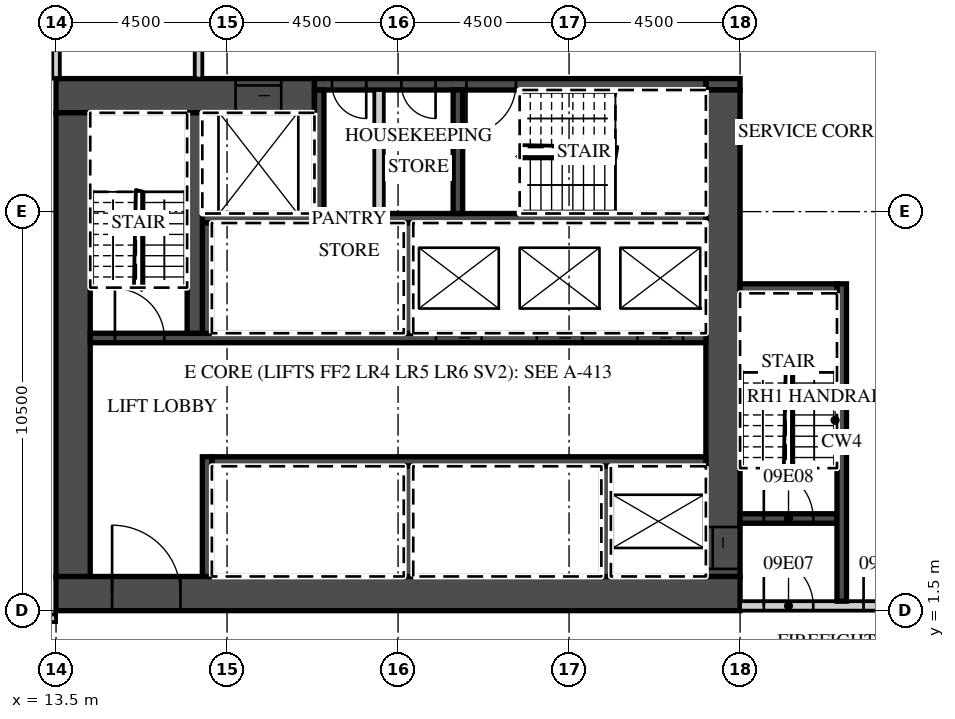
"""IFC4 building model, lengths in metres.
Left out: names, types, materials, properties, quantities, classifications, styles, units other than length and angle.
Written with IfcOpenShell. Run it as: python <this file> out.ifc"""

import sys

from ifc_helpers import new_model, si_unit, direction, frame, frame_2d, origin, place, context, subcontext, project, spatial, rectangle, extrude, element, fill, save


model = new_model("IFC4")
c1 = context("Model", 3, precision=1e-05, world=origin(), true_north=direction((0.0, 1.0)))
c2 = subcontext(c1, "Body", "Model", "MODEL_VIEW")
j1 = project(units=[si_unit("LENGTHUNIT", "METRE"), si_unit("PLANEANGLEUNIT", "RADIAN")], contexts=[c1])
p1 = place(None, origin())
s1 = spatial("IfcSite", under=j1, at=p1, CompositionType="ELEMENT")
p2 = place(p1, origin())
s2 = spatial("IfcBuilding", under=s1, at=p2, CompositionType="ELEMENT")
p3 = place(p2, frame((0.0, 0.0, 60.0)))
s3 = spatial("IfcBuildingStorey", under=s2, at=p3, CompositionType="ELEMENT", Elevation=60.0)
p4 = place(p3, frame((13.5, 15.5, 0.0), z_axis=(0.0, 0.0, 1.0), x_axis=(0.0, 1.0, 0.0)))
e1 = element("IfcWall", 1, at=p4, inside=s3, PredefinedType="PARTITIONING", context=c2, shape_type="SweptSolid", body=[
    extrude(rectangle(XDim=6.05, YDim=0.2, at=frame_2d((3.025, 0.0))), origin(), (0.0, 0.0, 1.0), 3.02),
])
p5 = place(p3, frame((-44.55, 1.3, 0.0), z_axis=(0.0, 0.0, 1.0), x_axis=(1.0, 0.0, 0.0)))
e2 = element("IfcWall", 2, at=p5, inside=s3, PredefinedType="PARTITIONING", context=c2, shape_type="SweptSolid", body=[
    extrude(rectangle(XDim=58.05, YDim=0.2, at=frame_2d((29.025, 0.0))), origin(), (0.0, 0.0, 1.0), 3.02),
])
p6 = place(p5, frame((0.525, 0.0, 0.0)))
e3 = element("IfcOpeningElement", 3, at=p6, cuts=e2, PredefinedType="OPENING", context=c2, shape_type="SweptSolid", body=[
    extrude(rectangle(XDim=1.0, YDim=2.1, at=frame_2d((0.5, 1.05))), frame((0.0, 0.11, 0.0), z_axis=(0.0, -1.0, 0.0), x_axis=(1.0, 0.0, 0.0)), (0.0, 0.0, 1.0), 0.22),
])
p7 = place(p5, frame((6.975, 0.0, 0.0)))
e4 = element("IfcOpeningElement", 4, at=p7, cuts=e2, PredefinedType="OPENING", context=c2, shape_type="SweptSolid", body=[
    extrude(rectangle(XDim=1.0, YDim=2.1, at=frame_2d((0.5, 1.05))), frame((0.0, 0.11, 0.0), z_axis=(0.0, -1.0, 0.0), x_axis=(1.0, 0.0, 0.0)), (0.0, 0.0, 1.0), 0.22),
])
p8 = place(p5, frame((10.987, 0.0, 0.0)))
e5 = element("IfcOpeningElement", 5, at=p8, cuts=e2, PredefinedType="OPENING", context=c2, shape_type="SweptSolid", body=[
    extrude(rectangle(XDim=1.2, YDim=2.1, at=frame_2d((0.6, 1.05))), frame((0.0, 0.11, 0.0), z_axis=(0.0, -1.0, 0.0), x_axis=(1.0, 0.0, 0.0)), (0.0, 0.0, 1.0), 0.22),
])
p9 = place(p5, frame((19.987, 0.0, 0.0)))
e6 = element("IfcOpeningElement", 6, at=p9, cuts=e2, PredefinedType="OPENING", context=c2, shape_type="SweptSolid", body=[
    extrude(rectangle(XDim=1.2, YDim=2.1, at=frame_2d((0.6, 1.05))), frame((0.0, 0.11, 0.0), z_axis=(0.0, -1.0, 0.0), x_axis=(1.0, 0.0, 0.0)), (0.0, 0.0, 1.0), 0.22),
])
p10 = place(p5, frame((29.5, 0.0, 0.0)))
e7 = element("IfcOpeningElement", 7, at=p10, cuts=e2, PredefinedType="OPENING", context=c2, shape_type="SweptSolid", body=[
    extrude(rectangle(XDim=1.0, YDim=2.1, at=frame_2d((0.5, 1.05))), frame((0.0, 0.11, 0.0), z_axis=(0.0, -1.0, 0.0), x_axis=(1.0, 0.0, 0.0)), (0.0, 0.0, 1.0), 0.22),
])
p11 = place(p5, frame((33.975, 0.0, 0.0)))
e8 = element("IfcOpeningElement", 8, at=p11, cuts=e2, PredefinedType="OPENING", context=c2, shape_type="SweptSolid", body=[
    extrude(rectangle(XDim=1.0, YDim=2.1, at=frame_2d((0.5, 1.05))), frame((0.0, 0.11, 0.0), z_axis=(0.0, -1.0, 0.0), x_axis=(1.0, 0.0, 0.0)), (0.0, 0.0, 1.0), 0.22),
])
p12 = place(p5, frame((40.912, 0.0, 0.0)))
e9 = element("IfcOpeningElement", 9, at=p12, cuts=e2, PredefinedType="OPENING", context=c2, shape_type="SweptSolid", body=[
    extrude(rectangle(XDim=1.2, YDim=2.1, at=frame_2d((0.6, 1.05))), frame((0.0, 0.11, 0.0), z_axis=(0.0, -1.0, 0.0), x_axis=(1.0, 0.0, 0.0)), (0.0, 0.0, 1.0), 0.22),
])
p13 = place(p5, frame((47.5, 0.0, 0.0)))
e10 = element("IfcOpeningElement", 10, at=p13, cuts=e2, PredefinedType="OPENING", context=c2, shape_type="SweptSolid", body=[
    extrude(rectangle(XDim=1.0, YDim=2.1, at=frame_2d((0.5, 1.05))), frame((0.0, 0.11, 0.0), z_axis=(0.0, -1.0, 0.0), x_axis=(1.0, 0.0, 0.0)), (0.0, 0.0, 1.0), 0.22),
])
p14 = place(p5, frame((51.975, 0.0, 0.0)))
e11 = element("IfcOpeningElement", 11, at=p14, cuts=e2, PredefinedType="OPENING", context=c2, shape_type="SweptSolid", body=[
    extrude(rectangle(XDim=1.0, YDim=2.1, at=frame_2d((0.5, 1.05))), frame((0.0, 0.11, 0.0), z_axis=(0.0, -1.0, 0.0), x_axis=(1.0, 0.0, 0.0)), (0.0, 0.0, 1.0), 0.22),
])
p15 = place(p5, frame((56.475, 0.0, 0.0)))
e12 = element("IfcOpeningElement", 12, at=p15, cuts=e2, PredefinedType="OPENING", context=c2, shape_type="SweptSolid", body=[
    extrude(rectangle(XDim=1.0, YDim=2.1, at=frame_2d((0.5, 1.05))), frame((0.0, 0.11, 0.0), z_axis=(0.0, -1.0, 0.0), x_axis=(1.0, 0.0, 0.0)), (0.0, 0.0, 1.0), 0.22),
])
p16 = place(p3, frame((13.5, 1.95, 0.0), z_axis=(0.0, 0.0, 1.0), x_axis=(1.0, 0.0, 0.0)))
e13 = element("IfcWall", 13, at=p16, inside=s3, PredefinedType="SHEAR", context=c2, shape_type="SweptSolid", body=[
    extrude(rectangle(XDim=18.0, YDim=0.9, at=frame_2d((9.0, 0.0))), origin(), (0.0, 0.0, 1.0), 3.02),
])
p17 = place(p16, frame((1.475, 0.0, 0.0)))
e14 = element("IfcOpeningElement", 14, at=p17, cuts=e13, PredefinedType="OPENING", context=c2, shape_type="SweptSolid", body=[
    extrude(rectangle(XDim=1.8, YDim=2.1, at=frame_2d((0.9, 1.05))), frame((0.0, 0.46, 0.0), z_axis=(0.0, -1.0, 0.0), x_axis=(1.0, 0.0, 0.0)), (0.0, 0.0, 1.0), 0.92),
])
p18 = place(p3, frame((13.5, 15.05, 0.0), z_axis=(0.0, 0.0, 1.0), x_axis=(1.0, 0.0, 0.0)))
e15 = element("IfcWall", 15, at=p18, inside=s3, PredefinedType="SHEAR", context=c2, shape_type="SweptSolid", body=[
    extrude(rectangle(XDim=6.8, YDim=0.9, at=frame_2d((3.4, 0.0))), origin(), (0.0, 0.0, 1.0), 3.02),
])
p19 = place(p18, frame((4.725, 0.0, 0.0)))
e16 = element("IfcOpeningElement", 16, at=p19, cuts=e15, PredefinedType="OPENING", context=c2, shape_type="SweptSolid", body=[
    extrude(rectangle(XDim=1.2, YDim=2.1, at=frame_2d((0.6, 1.05))), frame((0.0, 0.46, 0.0), z_axis=(0.0, -1.0, 0.0), x_axis=(1.0, 0.0, 0.0)), (0.0, 0.0, 1.0), 0.92),
])
p20 = place(p3, frame((30.6, 15.35, 0.0), z_axis=(0.0, 0.0, 1.0), x_axis=(1.0, 0.0, 0.0)))
e17 = element("IfcWall", 17, at=p20, inside=s3, PredefinedType="SHEAR", context=c2, shape_type="SweptSolid", body=[
    extrude(rectangle(XDim=0.9, YDim=0.3, at=frame_2d((0.45, 0.0))), origin(), (0.0, 0.0, 1.0), 3.02),
])
p21 = place(p3, frame((20.3, 15.35, 0.0), z_axis=(0.0, 0.0, 1.0), x_axis=(1.0, 0.0, 0.0)))
e18 = element("IfcWall", 18, at=p21, inside=s3, PredefinedType="SHEAR", context=c2, shape_type="SweptSolid", body=[
    extrude(rectangle(XDim=10.3, YDim=0.3, at=frame_2d((5.15, 0.0))), origin(), (0.0, 0.0, 1.0), 3.02),
])
p22 = place(p21, frame((4.0, 0.0, 0.0)))
e19 = element("IfcOpeningElement", 19, at=p22, cuts=e18, PredefinedType="OPENING", context=c2, shape_type="SweptSolid", body=[
    extrude(rectangle(XDim=1.3, YDim=2.1, at=frame_2d((0.65, 1.05))), frame((0.0, 0.16, 0.0), z_axis=(0.0, -1.0, 0.0), x_axis=(1.0, 0.0, 0.0)), (0.0, 0.0, 1.0), 0.32),
])
p23 = place(p21, frame((2.288, 0.0, 0.0)))
e20 = element("IfcOpeningElement", 20, at=p23, cuts=e18, PredefinedType="OPENING", context=c2, shape_type="SweptSolid", body=[
    extrude(rectangle(XDim=0.9, YDim=2.1, at=frame_2d((0.45, 1.05))), frame((0.0, 0.16, 0.0), z_axis=(0.0, -1.0, 0.0), x_axis=(1.0, 0.0, 0.0)), (0.0, 0.0, 1.0), 0.32),
])
p24 = place(p21, frame((0.462, 0.0, 0.0)))
e21 = element("IfcOpeningElement", 21, at=p24, cuts=e18, PredefinedType="OPENING", context=c2, shape_type="SweptSolid", body=[
    extrude(rectangle(XDim=0.9, YDim=2.1, at=frame_2d((0.45, 1.05))), frame((0.0, 0.16, 0.0), z_axis=(0.0, -1.0, 0.0), x_axis=(1.0, 0.0, 0.0)), (0.0, 0.0, 1.0), 0.32),
])
p25 = place(p3, frame((31.05, 2.4, 0.0), z_axis=(0.0, 0.0, 1.0), x_axis=(0.0, 1.0, 0.0)))
e22 = element("IfcWall", 22, at=p25, inside=s3, PredefinedType="SHEAR", context=c2, shape_type="SweptSolid", body=[
    extrude(rectangle(XDim=12.8, YDim=0.9, at=frame_2d((6.4, 0.0))), origin(), (0.0, 0.0, 1.0), 3.02),
])
p26 = place(p25, frame((0.2, 0.0, 0.0)))
e23 = element("IfcOpeningElement", 23, at=p26, cuts=e22, PredefinedType="OPENING", context=c2, shape_type="SweptSolid", body=[
    extrude(rectangle(XDim=1.1, YDim=2.1, at=frame_2d((0.55, 1.05))), frame((0.0, 0.46, 0.0), z_axis=(0.0, -1.0, 0.0), x_axis=(1.0, 0.0, 0.0)), (0.0, 0.0, 1.0), 0.92),
])
p27 = place(p3, frame((13.95, 2.4, 0.0), z_axis=(0.0, 0.0, 1.0), x_axis=(0.0, 1.0, 0.0)))
e24 = element("IfcWall", 24, at=p27, inside=s3, PredefinedType="SHEAR", context=c2, shape_type="SweptSolid", body=[
    extrude(rectangle(XDim=12.2, YDim=0.9, at=frame_2d((6.1, 0.0))), origin(), (0.0, 0.0, 1.0), 3.02),
])
p28 = place(p3, frame((17.6, 5.425, 0.0), z_axis=(0.0, 0.0, 1.0), x_axis=(1.0, 0.0, 0.0)))
e25 = element("IfcWall", 25, at=p28, inside=s3, PredefinedType="SHEAR", context=c2, shape_type="SweptSolid", body=[
    extrude(rectangle(XDim=13.0, YDim=0.25, at=frame_2d((6.5, 0.0))), origin(), (0.0, 0.0, 1.0), 3.02),
])
p29 = place(p3, frame((17.475, 2.4, 0.0), z_axis=(0.0, 0.0, 1.0), x_axis=(0.0, 1.0, 0.0)))
e26 = element("IfcWall", 26, at=p29, inside=s3, PredefinedType="SHEAR", context=c2, shape_type="SweptSolid", body=[
    extrude(rectangle(XDim=3.15, YDim=0.25, at=frame_2d((1.575, 0.0))), origin(), (0.0, 0.0, 1.0), 3.02),
])
for number, where, z_axis, x_axis in (
    (27, (27.975, 2.4, 0.0), (0.0, 0.0, 1.0), (0.0, 1.0, 0.0)),
    (28, (22.775, 2.4, 0.0), (0.0, 0.0, 1.0), (0.0, 1.0, 0.0)),
):
    element("IfcWall", number, at=place(p3, frame(where, z_axis=z_axis, x_axis=x_axis)), inside=s3, PredefinedType="SHEAR", context=c2, shape_type="SweptSolid", body=[
        extrude(rectangle(XDim=2.9, YDim=0.25, at=frame_2d((1.45, 0.0))), origin(), (0.0, 0.0, 1.0), 3.02),
    ])
p30 = place(p3, frame((14.4, 8.675, 0.0), z_axis=(0.0, 0.0, 1.0), x_axis=(1.0, 0.0, 0.0)))
e29 = element("IfcWall", 29, at=p30, inside=s3, PredefinedType="SHEAR", context=c2, shape_type="SweptSolid", body=[
    extrude(rectangle(XDim=16.2, YDim=0.25, at=frame_2d((8.1, 0.0))), origin(), (0.0, 0.0, 1.0), 3.02),
])
p31 = place(p30, frame((14.4, 0.0, 0.0)))
e30 = element("IfcOpeningElement", 30, at=p31, cuts=e29, PredefinedType="OPENING", context=c2, shape_type="SweptSolid", body=[
    extrude(rectangle(XDim=1.2, YDim=2.1, at=frame_2d((0.6, 1.05))), frame((0.0, 0.135, 0.0), z_axis=(0.0, -1.0, 0.0), x_axis=(1.0, 0.0, 0.0)), (0.0, 0.0, 1.0), 0.27),
])
p32 = place(p30, frame((11.75, 0.0, 0.0)))
e31 = element("IfcOpeningElement", 31, at=p32, cuts=e29, PredefinedType="OPENING", context=c2, shape_type="SweptSolid", body=[
    extrude(rectangle(XDim=1.2, YDim=2.1, at=frame_2d((0.6, 1.05))), frame((0.0, 0.135, 0.0), z_axis=(0.0, -1.0, 0.0), x_axis=(1.0, 0.0, 0.0)), (0.0, 0.0, 1.0), 0.27),
])
p33 = place(p30, frame((9.1, 0.0, 0.0)))
e32 = element("IfcOpeningElement", 32, at=p33, cuts=e29, PredefinedType="OPENING", context=c2, shape_type="SweptSolid", body=[
    extrude(rectangle(XDim=1.2, YDim=2.1, at=frame_2d((0.6, 1.05))), frame((0.0, 0.135, 0.0), z_axis=(0.0, -1.0, 0.0), x_axis=(1.0, 0.0, 0.0)), (0.0, 0.0, 1.0), 0.27),
])
p34 = place(p30, frame((0.65, 0.0, 0.0)))
e33 = element("IfcOpeningElement", 33, at=p34, cuts=e29, PredefinedType="OPENING", context=c2, shape_type="SweptSolid", body=[
    extrude(rectangle(XDim=1.3, YDim=2.1, at=frame_2d((0.65, 1.05))), frame((0.0, 0.135, 0.0), z_axis=(0.0, -1.0, 0.0), x_axis=(1.0, 0.0, 0.0)), (0.0, 0.0, 1.0), 0.27),
])
p35 = place(p3, frame((17.35, 11.825, 0.0), z_axis=(0.0, 0.0, 1.0), x_axis=(1.0, 0.0, 0.0)))
e34 = element("IfcWall", 34, at=p35, inside=s3, PredefinedType="SHEAR", context=c2, shape_type="SweptSolid", body=[
    extrude(rectangle(XDim=13.25, YDim=0.25, at=frame_2d((6.625, 0.0))), origin(), (0.0, 0.0, 1.0), 3.02),
])
for number, where, z_axis, x_axis in (
    (35, (17.475, 8.8, 0.0), (0.0, 0.0, 1.0), (0.0, 1.0, 0.0)),
    (36, (22.775, 8.8, 0.0), (0.0, 0.0, 1.0), (0.0, 1.0, 0.0)),
):
    element("IfcWall", number, at=place(p3, frame(where, z_axis=z_axis, x_axis=x_axis)), inside=s3, PredefinedType="SHEAR", context=c2, shape_type="SweptSolid", body=[
        extrude(rectangle(XDim=2.9, YDim=0.25, at=frame_2d((1.45, 0.0))), origin(), (0.0, 0.0, 1.0), 3.02),
    ])
p36 = place(p3, frame((17.15, 8.8, 0.0), z_axis=(0.0, 0.0, 1.0), x_axis=(0.0, 1.0, 0.0)))
e37 = element("IfcWall", 37, at=p36, inside=s3, PredefinedType="SHEAR", context=c2, shape_type="SweptSolid", body=[
    extrude(rectangle(XDim=5.8, YDim=0.4, at=frame_2d((2.9, 0.0))), origin(), (0.0, 0.0, 1.0), 3.02),
])
for number, where, z_axis, x_axis in (
    (38, (20.425, 11.95, 0.0), (0.0, 0.0, 1.0), (0.0, 1.0, 0.0)),
    (39, (24.075, 11.95, 0.0), (0.0, 0.0, 1.0), (0.0, 1.0, 0.0)),
):
    element("IfcWall", number, at=place(p3, frame(where, z_axis=z_axis, x_axis=x_axis)), inside=s3, PredefinedType="SHEAR", context=c2, shape_type="SweptSolid", body=[
        extrude(rectangle(XDim=3.25, YDim=0.25, at=frame_2d((1.625, 0.0))), origin(), (0.0, 0.0, 1.0), 3.02),
    ])
p37 = place(p3, frame((22.0, 11.95, 0.0), z_axis=(0.0, 0.0, 1.0), x_axis=(0.0, 1.0, 0.0)))
e40 = element("IfcWall", 40, at=p37, inside=s3, PredefinedType="PARTITIONING", context=c2, shape_type="SweptSolid", body=[
    extrude(rectangle(XDim=3.25, YDim=0.25, at=frame_2d((1.625, 0.0))), origin(), (0.0, 0.0, 1.0), 3.02),
])
p38 = place(p3, frame((31.5, 1.625, 0.0), z_axis=(0.0, 0.0, 1.0), x_axis=(1.0, 0.0, 0.0)))
e41 = element("IfcWall", 41, at=p38, inside=s3, PredefinedType="PARTITIONING", context=c2, shape_type="SweptSolid", body=[
    extrude(rectangle(XDim=13.05, YDim=0.25, at=frame_2d((6.525, 0.0))), origin(), (0.0, 0.0, 1.0), 3.02),
])
p39 = place(p38, frame((0.625, 0.0, 0.0)))
e42 = element("IfcOpeningElement", 42, at=p39, cuts=e41, PredefinedType="OPENING", context=c2, shape_type="SweptSolid", body=[
    extrude(rectangle(XDim=1.3, YDim=2.1, at=frame_2d((0.65, 1.05))), frame((0.0, 0.135, 0.0), z_axis=(0.0, -1.0, 0.0), x_axis=(1.0, 0.0, 0.0)), (0.0, 0.0, 1.0), 0.27),
])
p40 = place(p38, frame((3.25, 0.0, 0.0)))
e43 = element("IfcOpeningElement", 43, at=p40, cuts=e41, PredefinedType="OPENING", context=c2, shape_type="SweptSolid", body=[
    extrude(rectangle(XDim=1.1, YDim=2.1, at=frame_2d((0.55, 1.05))), frame((0.0, 0.135, 0.0), z_axis=(0.0, -1.0, 0.0), x_axis=(1.0, 0.0, 0.0)), (0.0, 0.0, 1.0), 0.27),
])
p41 = place(p3, frame((31.5, 3.925, 0.0), z_axis=(0.0, 0.0, 1.0), x_axis=(1.0, 0.0, 0.0)))
e44 = element("IfcWall", 44, at=p41, inside=s3, PredefinedType="SHEAR", context=c2, shape_type="SweptSolid", body=[
    extrude(rectangle(XDim=2.55, YDim=0.25, at=frame_2d((1.275, 0.0))), origin(), (0.0, 0.0, 1.0), 3.02),
])
p42 = place(p41, frame((0.625, 0.0, 0.0)))
e45 = element("IfcOpeningElement", 45, at=p42, cuts=e44, PredefinedType="OPENING", context=c2, shape_type="SweptSolid", body=[
    extrude(rectangle(XDim=1.3, YDim=2.1, at=frame_2d((0.65, 1.05))), frame((0.0, 0.135, 0.0), z_axis=(0.0, -1.0, 0.0), x_axis=(1.0, 0.0, 0.0)), (0.0, 0.0, 1.0), 0.27),
])
p43 = place(p3, frame((34.175, 1.75, 0.0), z_axis=(0.0, 0.0, 1.0), x_axis=(0.0, 1.0, 0.0)))
e46 = element("IfcWall", 46, at=p43, inside=s3, PredefinedType="SHEAR", context=c2, shape_type="SweptSolid", body=[
    extrude(rectangle(XDim=8.35, YDim=0.25, at=frame_2d((4.175, 0.0))), origin(), (0.0, 0.0, 1.0), 3.02),
])
p44 = place(p3, frame((31.5, 9.975, 0.0), z_axis=(0.0, 0.0, 1.0), x_axis=(1.0, 0.0, 0.0)))
e47 = element("IfcWall", 47, at=p44, inside=s3, PredefinedType="SHEAR", context=c2, shape_type="SweptSolid", body=[
    extrude(rectangle(XDim=2.55, YDim=0.25, at=frame_2d((1.275, 0.0))), origin(), (0.0, 0.0, 1.0), 3.02),
])
p45 = place(p3, frame((17.25, 15.5, 0.0), z_axis=(0.0, 0.0, 1.0), x_axis=(0.0, 1.0, 0.0)))
e48 = element("IfcWall", 48, at=p45, inside=s3, PredefinedType="PARTITIONING", context=c2, shape_type="SweptSolid", body=[
    extrude(rectangle(XDim=2.2, YDim=0.2, at=frame_2d((1.1, 0.0))), origin(), (0.0, 0.0, 1.0), 3.02),
])
p46 = place(p31, origin())
e49 = element("IfcDoor", 49, at=p46, inside=s3, OperationType="SLIDING_TO_LEFT", PredefinedType="DOOR", context=c2, shape_type="SweptSolid", body=[
    extrude(rectangle(XDim=1.2, YDim=2.1, at=frame_2d((0.6, 1.05))), frame((0.0, 0.025, 0.0), z_axis=(0.0, -1.0, 0.0), x_axis=(1.0, 0.0, 0.0)), (0.0, 0.0, 1.0), 0.05),
])
fill(e30, e49)
p47 = place(p32, origin())
e50 = element("IfcDoor", 50, at=p47, inside=s3, OperationType="SLIDING_TO_RIGHT", PredefinedType="DOOR", context=c2, shape_type="SweptSolid", body=[
    extrude(rectangle(XDim=1.2, YDim=2.1, at=frame_2d((0.6, 1.05))), frame((0.0, 0.025, 0.0), z_axis=(0.0, -1.0, 0.0), x_axis=(1.0, 0.0, 0.0)), (0.0, 0.0, 1.0), 0.05),
])
fill(e31, e50)
p48 = place(p33, origin())
e51 = element("IfcDoor", 51, at=p48, inside=s3, OperationType="SLIDING_TO_RIGHT", PredefinedType="DOOR", context=c2, shape_type="SweptSolid", body=[
    extrude(rectangle(XDim=1.2, YDim=2.1, at=frame_2d((0.6, 1.05))), frame((0.0, 0.025, 0.0), z_axis=(0.0, -1.0, 0.0), x_axis=(1.0, 0.0, 0.0)), (0.0, 0.0, 1.0), 0.05),
])
fill(e32, e51)
p49 = place(p19, origin())
e52 = element("IfcDoor", 52, at=p49, inside=s3, OperationType="SLIDING_TO_LEFT", PredefinedType="DOOR", context=c2, shape_type="SweptSolid", body=[
    extrude(rectangle(XDim=1.2, YDim=2.1, at=frame_2d((0.6, 1.05))), frame((0.0, 0.025, 0.0), z_axis=(0.0, -1.0, 0.0), x_axis=(1.0, 0.0, 0.0)), (0.0, 0.0, 1.0), 0.05),
])
fill(e16, e52)
p50 = place(p26, origin())
e53 = element("IfcDoor", 53, at=p50, inside=s3, OperationType="SLIDING_TO_LEFT", PredefinedType="DOOR", context=c2, shape_type="SweptSolid", body=[
    extrude(rectangle(XDim=1.1, YDim=2.1, at=frame_2d((0.55, 1.05))), frame((0.0, 0.025, 0.0), z_axis=(0.0, -1.0, 0.0), x_axis=(1.0, 0.0, 0.0)), (0.0, 0.0, 1.0), 0.05),
])
fill(e23, e53)
p51 = place(p17, origin())
e54 = element("IfcDoor", 54, at=p51, inside=s3, OperationType="DOUBLE_DOOR_DOUBLE_SWING", PredefinedType="DOOR", context=c2, shape_type="SweptSolid", body=[
    extrude(rectangle(XDim=1.8, YDim=2.1, at=frame_2d((0.9, 1.05))), frame((0.0, 0.025, 0.0), z_axis=(0.0, -1.0, 0.0), x_axis=(1.0, 0.0, 0.0)), (0.0, 0.0, 1.0), 0.05),
])
fill(e14, e54)
p52 = place(p39, origin())
e55 = element("IfcDoor", 55, at=p52, inside=s3, OperationType="SINGLE_SWING_LEFT", PredefinedType="DOOR", context=c2, shape_type="SweptSolid", body=[
    extrude(rectangle(XDim=1.3, YDim=2.1, at=frame_2d((0.65, 1.05))), frame((0.0, 0.025, 0.0), z_axis=(0.0, -1.0, 0.0), x_axis=(1.0, 0.0, 0.0)), (0.0, 0.0, 1.0), 0.05),
])
fill(e42, e55)
p53 = place(p42, origin())
e56 = element("IfcDoor", 56, at=p53, inside=s3, OperationType="SINGLE_SWING_LEFT", PredefinedType="DOOR", context=c2, shape_type="SweptSolid", body=[
    extrude(rectangle(XDim=1.3, YDim=2.1, at=frame_2d((0.65, 1.05))), frame((0.0, 0.025, 0.0), z_axis=(0.0, -1.0, 0.0), x_axis=(1.0, 0.0, 0.0)), (0.0, 0.0, 1.0), 0.05),
])
fill(e45, e56)
p54 = place(p40, origin())
e57 = element("IfcDoor", 57, at=p54, inside=s3, OperationType="SINGLE_SWING_LEFT", PredefinedType="DOOR", context=c2, shape_type="SweptSolid", body=[
    extrude(rectangle(XDim=1.1, YDim=2.1, at=frame_2d((0.55, 1.05))), frame((0.0, 0.025, 0.0), z_axis=(0.0, -1.0, 0.0), x_axis=(1.0, 0.0, 0.0)), (0.0, 0.0, 1.0), 0.05),
])
fill(e43, e57)
p55 = place(p34, origin())
e58 = element("IfcDoor", 58, at=p55, inside=s3, OperationType="SINGLE_SWING_LEFT", PredefinedType="DOOR", context=c2, shape_type="SweptSolid", body=[
    extrude(rectangle(XDim=1.3, YDim=2.1, at=frame_2d((0.65, 1.05))), frame((0.0, 0.025, 0.0), z_axis=(0.0, -1.0, 0.0), x_axis=(1.0, 0.0, 0.0)), (0.0, 0.0, 1.0), 0.05),
])
fill(e33, e58)
p56 = place(p22, origin())
e59 = element("IfcDoor", 59, at=p56, inside=s3, OperationType="SINGLE_SWING_LEFT", PredefinedType="DOOR", context=c2, shape_type="SweptSolid", body=[
    extrude(rectangle(XDim=1.3, YDim=2.1, at=frame_2d((0.65, 1.05))), frame((0.0, 0.025, 0.0), z_axis=(0.0, -1.0, 0.0), x_axis=(1.0, 0.0, 0.0)), (0.0, 0.0, 1.0), 0.05),
])
fill(e19, e59)
p57 = place(p23, origin())
e60 = element("IfcDoor", 60, at=p57, inside=s3, OperationType="SINGLE_SWING_RIGHT", PredefinedType="DOOR", context=c2, shape_type="SweptSolid", body=[
    extrude(rectangle(XDim=0.9, YDim=2.1, at=frame_2d((0.45, 1.05))), frame((0.0, 0.025, 0.0), z_axis=(0.0, -1.0, 0.0), x_axis=(1.0, 0.0, 0.0)), (0.0, 0.0, 1.0), 0.05),
])
fill(e20, e60)
p58 = place(p24, origin())
e61 = element("IfcDoor", 61, at=p58, inside=s3, OperationType="SINGLE_SWING_RIGHT", PredefinedType="DOOR", context=c2, shape_type="SweptSolid", body=[
    extrude(rectangle(XDim=0.9, YDim=2.1, at=frame_2d((0.45, 1.05))), frame((0.0, 0.025, 0.0), z_axis=(0.0, -1.0, 0.0), x_axis=(1.0, 0.0, 0.0)), (0.0, 0.0, 1.0), 0.05),
])
fill(e21, e61)
save(model, sys.argv[1])
